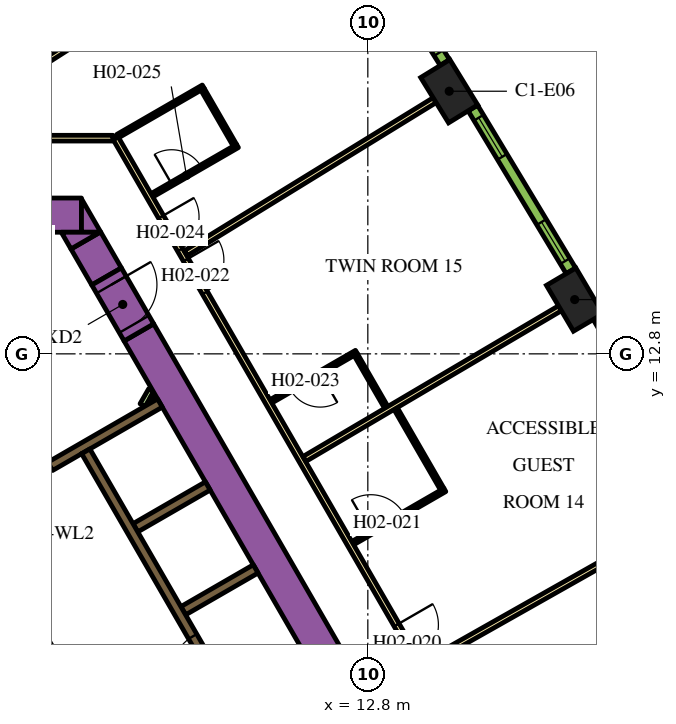
"""IFC4 building model, lengths in metres.
Left out: names, types, materials, properties, quantities, classifications, styles, units other than length and angle.
Written with IfcOpenShell. Run it as: python <this file> out.ifc"""

import sys

from ifc_helpers import new_model, si_unit, direction, frame, frame_2d, origin, origin_2d, place, context, subcontext, project, spatial, polyline, rectangle, outline, extrude, element, fill, save


model = new_model("IFC4")
c1 = context("Model", 3, precision=1e-05, world=origin(), true_north=direction((0.0, 1.0)))
c2 = subcontext(c1, "Body", "Model", "MODEL_VIEW")
j1 = project(units=[si_unit("LENGTHUNIT", "METRE"), si_unit("PLANEANGLEUNIT", "RADIAN")], contexts=[c1])
p1 = place(None, origin())
s1 = spatial("IfcSite", under=j1, at=p1, CompositionType="ELEMENT")
p2 = place(p1, origin())
s2 = spatial("IfcBuilding", under=s1, at=p2, CompositionType="ELEMENT")
p3 = place(p2, frame((0.0, 0.0, 47.1)))
s3 = spatial("IfcBuildingStorey", under=s2, at=p3, CompositionType="ELEMENT", Elevation=47.1)
for number, where, z_axis, x_axis in (
    (1, (18.243, 14.228, 0.0), (0.0, 0.0, 1.0), (-0.508, 0.861, 0.0)),
    (2, (14.942, 19.71, 0.0), (0.0, 0.0, 1.0), (-0.524, 0.852, 0.0)),
):
    element("IfcColumn", number, at=place(p3, frame(where, z_axis=z_axis, x_axis=x_axis)), inside=s3, PredefinedType="COLUMN", context=c2, shape_type="SweptSolid", body=[
        extrude(rectangle(XDim=1.4, YDim=0.9, at=origin_2d()), origin(), (0.0, 0.0, 1.0), 3.9),
    ])
p4 = place(p3, frame((6.776, 13.364, 0.0), z_axis=(0.0, 0.0, 1.0), x_axis=(0.500004177138, -0.8660229921, 0.0)))
e3 = element("IfcWall", 3, at=p4, inside=s3, PredefinedType="SOLIDWALL", context=c2, shape_type="SweptSolid", body=[
    extrude(rectangle(XDim=20.204, YDim=0.9, at=frame_2d((10.102, 0.0))), origin(), (0.0, 0.0, 1.0), 3.9),
])
p5 = place(p3, frame((-4.224, 16.45, 0.0), z_axis=(0.0, 0.0, 1.0), x_axis=(1.0, 0.0, 0.0)))
e4 = element("IfcWall", 4, at=p5, inside=s3, PredefinedType="SOLIDWALL", context=c2, shape_type="SweptSolid", body=[
    extrude(rectangle(XDim=9.488, YDim=0.9, at=frame_2d((4.744, 0.0))), origin(), (0.0, 0.0, 1.0), 3.9),
])
p6 = place(p3, origin())
e5 = element("IfcWall", 5, at=p6, inside=s3, PredefinedType="SOLIDWALL", context=c2, shape_type="SweptSolid", body=[
    extrude(outline(polyline([(5.265, 16.0), (5.265, 16.88), (5.773, 16.0), (5.265, 16.0)])), origin(), (0.0, 0.0, 1.0), 3.9),
])
p7 = place(p3, frame((5.926, 14.836, 0.0), z_axis=(0.0, 0.0, 1.0), x_axis=(-0.500076735116, 0.865981096212, 0.0)))
e6 = element("IfcWall", 6, at=p7, inside=s3, PredefinedType="SOLIDWALL", context=c2, shape_type="SweptSolid", body=[
    extrude(rectangle(XDim=1.094, YDim=0.9, at=frame_2d((0.547, 0.0))), origin(), (0.0, 0.0, 1.0), 3.9),
])
e7 = element("IfcWall", 7, at=p6, inside=s3, PredefinedType="SOLIDWALL", context=c2, shape_type="SweptSolid", body=[
    extrude(outline(polyline([(4.734, 16.0), (5.75, 16.0), (4.988, 15.56), (4.734, 16.0)])), origin(), (0.0, 0.0, 1.0), 3.9),
])
for number, where, z_axis, x_axis in (
    (8, (7.944, 6.041, 0.0), (0.0, 0.0, 1.0), (0.866, 0.5, 0.0)),
    (9, (6.684, 8.224, 0.0), (0.0, 0.0, 1.0), (0.866, 0.5, 0.0)),
):
    element("IfcWall", number, at=place(p3, frame(where, z_axis=z_axis, x_axis=x_axis)), inside=s3, PredefinedType="SOLIDWALL", context=c2, shape_type="SweptSolid", body=[
        extrude(rectangle(XDim=2.2, YDim=0.25, at=frame_2d((1.1, 0.0))), origin(), (0.0, 0.0, 1.0), 3.9),
    ])
e10 = element("IfcWall", 10, at=p6, inside=s3, PredefinedType="SOLIDWALL", context=c2, shape_type="SweptSolid", body=[
    extrude(outline(polyline([(5.27, 10.173), (5.27, 10.173), (4.683, 9.834), (4.504, 9.731), (4.442, 9.839), (4.431, 9.856), (4.419, 9.871), (4.406, 9.885), (4.39, 9.898), (4.374, 9.909), (4.357, 9.918), (4.341, 9.925), (7.266, 11.614), (7.391, 11.398), (5.486, 10.298), (5.486, 10.298), (5.27, 10.173), (5.27, 10.173)])), origin(), (0.0, 0.0, 1.0), 3.9),
])
p8 = place(p3, frame((5.97, -2.591, 0.0), z_axis=(0.0, 0.0, 1.0), x_axis=(-0.499994469932, 0.866028596547, 0.0)))
e11 = element("IfcWall", 11, at=p8, inside=s3, PredefinedType="SOLIDWALL", context=c2, shape_type="SweptSolid", body=[
    extrude(rectangle(XDim=10.488, YDim=0.25, at=frame_2d((5.244, 0.0))), origin(), (0.0, 0.0, 1.0), 3.9),
])
p9 = place(p3, frame((6.872, 11.45, 0.0), z_axis=(0.0, 0.0, 1.0), x_axis=(0.499846793097, 0.866113839764, 0.0)))
e12 = element("IfcWall", 12, at=p9, inside=s3, PredefinedType="PARTITIONING", context=c2, shape_type="SweptSolid", body=[
    extrude(rectangle(XDim=0.453, YDim=0.15, at=frame_2d((0.227, 0.0))), origin(), (0.0, 0.0, 1.0), 2.75),
])
p10 = place(p3, frame((7.131, 11.6, 0.0), z_axis=(0.0, 0.0, 1.0), x_axis=(0.498600033135, 0.866832167699, 0.0)))
e13 = element("IfcWall", 13, at=p10, inside=s3, PredefinedType="PARTITIONING", context=c2, shape_type="SweptSolid", body=[
    extrude(rectangle(XDim=0.107, YDim=0.15, at=frame_2d((0.053, 0.0))), origin(), (0.0, 0.0, 1.0), 2.75),
])
p11 = place(p3, frame((11.553, -0.46, 0.0), z_axis=(0.0, 0.0, 1.0), x_axis=(-0.500006514828, 0.866021642414, 0.0)))
e14 = element("IfcWall", 14, at=p11, inside=s3, PredefinedType="SOLIDWALL", context=c2, shape_type="SweptSolid", body=[
    extrude(rectangle(XDim=12.35, YDim=0.25, at=frame_2d((6.175, 0.0))), origin(), (0.0, 0.0, 1.0), 3.9),
])
p12 = place(p11, frame((0.585, 0.0, 0.0)))
e15 = element("IfcOpeningElement", 15, at=p12, cuts=e14, PredefinedType="OPENING", context=c2, shape_type="SweptSolid", body=[
    extrude(rectangle(XDim=1.1, YDim=2.1, at=frame_2d((0.55, 1.05))), frame((0.0, 0.135, 0.0), z_axis=(0.0, -1.0, 0.0), x_axis=(1.0, 0.0, 0.0)), (0.0, 0.0, 1.0), 0.27),
])
p13 = place(p11, frame((3.105, 0.0, 0.0)))
e16 = element("IfcOpeningElement", 16, at=p13, cuts=e14, PredefinedType="OPENING", context=c2, shape_type="SweptSolid", body=[
    extrude(rectangle(XDim=1.1, YDim=2.1, at=frame_2d((0.55, 1.05))), frame((0.0, 0.135, 0.0), z_axis=(0.0, -1.0, 0.0), x_axis=(1.0, 0.0, 0.0)), (0.0, 0.0, 1.0), 0.27),
])
p14 = place(p11, frame((5.625, 0.0, 0.0)))
e17 = element("IfcOpeningElement", 17, at=p14, cuts=e14, PredefinedType="OPENING", context=c2, shape_type="SweptSolid", body=[
    extrude(rectangle(XDim=1.1, YDim=2.1, at=frame_2d((0.55, 1.05))), frame((0.0, 0.135, 0.0), z_axis=(0.0, -1.0, 0.0), x_axis=(1.0, 0.0, 0.0)), (0.0, 0.0, 1.0), 0.27),
])
p15 = place(p3, frame((8.565, -2.185, 0.0), z_axis=(0.0, 0.0, 1.0), x_axis=(-0.499997954832, 0.866026584559, 0.0)))
e18 = element("IfcWall", 18, at=p15, inside=s3, PredefinedType="SOLIDWALL", context=c2, shape_type="SweptSolid", body=[
    extrude(rectangle(XDim=12.35, YDim=0.25, at=frame_2d((6.175, 0.0))), origin(), (0.0, 0.0, 1.0), 3.9),
])
p16 = place(p15, frame((5.725, 0.0, 0.0)))
e19 = element("IfcOpeningElement", 19, at=p16, cuts=e18, PredefinedType="OPENING", context=c2, shape_type="SweptSolid", body=[
    extrude(rectangle(XDim=0.9, YDim=2.1, at=frame_2d((0.45, 1.05))), frame((0.0, 0.135, 0.0), z_axis=(0.0, -1.0, 0.0), x_axis=(1.0, 0.0, 0.0)), (0.0, 0.0, 1.0), 0.27),
])
p17 = place(p3, frame((5.926, 14.836, 0.0), z_axis=(0.0, 0.0, 1.0), x_axis=(0.500062241894, -0.865989465428, 0.0)))
e20 = element("IfcWall", 20, at=p17, inside=s3, PredefinedType="SOLIDWALL", context=c2, shape_type="SweptSolid", body=[
    extrude(rectangle(XDim=1.7, YDim=0.9, at=frame_2d((0.85, 0.0))), origin(), (0.0, 0.0, 1.0), 3.9),
])
p18 = place(p17, frame((0.25, 0.0, 0.0)))
e21 = element("IfcOpeningElement", 21, at=p18, cuts=e20, PredefinedType="OPENING", context=c2, shape_type="SweptSolid", body=[
    extrude(rectangle(XDim=1.2, YDim=2.1, at=frame_2d((0.6, 1.05))), frame((0.0, 0.46, 0.0), z_axis=(0.0, -1.0, 0.0), x_axis=(1.0, 0.0, 0.0)), (0.0, 0.0, 1.0), 0.92),
])
p19 = place(p3, frame((6.163, 18.475, 0.0), z_axis=(0.0, 0.0, 1.0), x_axis=(0.500001317485, -0.866024643133, 0.0)))
e22 = element("IfcWall", 22, at=p19, inside=s3, PredefinedType="PARTITIONING", context=c2, shape_type="SweptSolid", body=[
    extrude(rectangle(XDim=25.767, YDim=0.15, at=frame_2d((12.883, 0.0))), origin(), (0.0, 0.0, 1.0), 2.75),
])
p20 = place(p19, frame((24.586, 0.0, 0.0)))
e23 = element("IfcOpeningElement", 23, at=p20, cuts=e22, PredefinedType="OPENING", context=c2, shape_type="SweptSolid", body=[
    extrude(rectangle(XDim=1.0, YDim=2.1, at=frame_2d((0.5, 1.05))), frame((0.0, 0.085, 0.0), z_axis=(0.0, -1.0, 0.0), x_axis=(1.0, 0.0, 0.0)), (0.0, 0.0, 1.0), 0.17),
])
p21 = place(p19, frame((16.196, 0.0, 0.0)))
e24 = element("IfcOpeningElement", 24, at=p21, cuts=e22, PredefinedType="OPENING", context=c2, shape_type="SweptSolid", body=[
    extrude(rectangle(XDim=1.0, YDim=2.1, at=frame_2d((0.5, 1.05))), frame((0.0, 0.085, 0.0), z_axis=(0.0, -1.0, 0.0), x_axis=(1.0, 0.0, 0.0)), (0.0, 0.0, 1.0), 0.17),
])
p22 = place(p19, frame((14.789, 0.0, 0.0)))
e25 = element("IfcOpeningElement", 25, at=p22, cuts=e22, PredefinedType="OPENING", context=c2, shape_type="SweptSolid", body=[
    extrude(rectangle(XDim=1.1, YDim=2.1, at=frame_2d((0.55, 1.05))), frame((0.0, 0.085, 0.0), z_axis=(0.0, -1.0, 0.0), x_axis=(1.0, 0.0, 0.0)), (0.0, 0.0, 1.0), 0.17),
])
p23 = place(p19, frame((3.698, 0.0, 0.0)))
e26 = element("IfcOpeningElement", 26, at=p23, cuts=e22, PredefinedType="OPENING", context=c2, shape_type="SweptSolid", body=[
    extrude(rectangle(XDim=1.0, YDim=2.1, at=frame_2d((0.5, 1.05))), frame((0.0, 0.085, 0.0), z_axis=(0.0, -1.0, 0.0), x_axis=(1.0, 0.0, 0.0)), (0.0, 0.0, 1.0), 0.17),
])
p24 = place(p19, frame((2.391, 0.0, 0.0)))
e27 = element("IfcOpeningElement", 27, at=p24, cuts=e22, PredefinedType="OPENING", context=c2, shape_type="SweptSolid", body=[
    extrude(rectangle(XDim=1.0, YDim=2.1, at=frame_2d((0.5, 1.05))), frame((0.0, 0.085, 0.0), z_axis=(0.0, -1.0, 0.0), x_axis=(1.0, 0.0, 0.0)), (0.0, 0.0, 1.0), 0.17),
])
p25 = place(p3, frame((0.825, 18.475, 0.0), z_axis=(0.0, 0.0, 1.0), x_axis=(1.0, 0.0, 0.0)))
e28 = element("IfcWall", 28, at=p25, inside=s3, PredefinedType="PARTITIONING", context=c2, shape_type="SweptSolid", body=[
    extrude(rectangle(XDim=5.268, YDim=0.15, at=frame_2d((2.634, 0.0))), origin(), (0.0, 0.0, 1.0), 2.75),
])
p26 = place(p3, frame((11.16, 24.888, 0.0), z_axis=(0.0, 0.0, 1.0), x_axis=(-0.84199813156, -0.539480441211, 0.0)))
e29 = element("IfcWall", 29, at=p26, inside=s3, PredefinedType="PARTITIONING", context=c2, shape_type="SweptSolid", body=[
    extrude(rectangle(XDim=11.638, YDim=0.15, at=frame_2d((5.819, 0.0))), origin(), (0.0, 0.0, 1.0), 2.75),
])
p27 = place(p3, frame((14.558, 19.475, 0.0), z_axis=(0.0, 0.0, 1.0), x_axis=(-0.851829455142, -0.523819223925, 0.0)))
e30 = element("IfcWall", 30, at=p27, inside=s3, PredefinedType="PARTITIONING", context=c2, shape_type="SweptSolid", body=[
    extrude(rectangle(XDim=7.688, YDim=0.15, at=frame_2d((3.844, 0.0))), origin(), (0.0, 0.0, 1.0), 2.75),
])
p28 = place(p3, frame((17.856, 13.999, 0.0), z_axis=(0.0, 0.0, 1.0), x_axis=(-0.861371519381, -0.507975497047, 0.0)))
e31 = element("IfcWall", 31, at=p28, inside=s3, PredefinedType="PARTITIONING", context=c2, shape_type="SweptSolid", body=[
    extrude(rectangle(XDim=7.804, YDim=0.15, at=frame_2d((3.902, 0.0))), origin(), (0.0, 0.0, 1.0), 2.75),
])
p29 = place(p3, frame((21.052, 8.464, 0.0), z_axis=(0.0, 0.0, 1.0), x_axis=(-0.87059371954, -0.492002617368, 0.0)))
e32 = element("IfcWall", 32, at=p29, inside=s3, PredefinedType="PARTITIONING", context=c2, shape_type="SweptSolid", body=[
    extrude(rectangle(XDim=7.803, YDim=0.15, at=frame_2d((3.902, 0.0))), origin(), (0.0, 0.0, 1.0), 2.75),
])
p30 = place(p3, frame((12.402, 7.819, 0.0), z_axis=(0.0, 0.0, 1.0), x_axis=(0.866034573852, 0.49998411664, 0.0)))
e33 = element("IfcWall", 33, at=p30, inside=s3, PredefinedType="PARTITIONING", context=c2, shape_type="SweptSolid", body=[
    extrude(rectangle(XDim=2.8, YDim=0.1, at=frame_2d((1.4, 0.0))), origin(), (0.0, 0.0, 1.0), 2.75),
])
p31 = place(p30, frame((0.55, 0.0, 0.0)))
e34 = element("IfcOpeningElement", 34, at=p31, cuts=e33, PredefinedType="OPENING", context=c2, shape_type="SweptSolid", body=[
    extrude(rectangle(XDim=1.0, YDim=2.1, at=frame_2d((0.5, 1.05))), frame((0.0, 0.06, 0.0), z_axis=(0.0, -1.0, 0.0), x_axis=(1.0, 0.0, 0.0)), (0.0, 0.0, 1.0), 0.12),
])
p32 = place(p3, frame((14.759, 9.237, 0.0), z_axis=(0.0, 0.0, 1.0), x_axis=(-0.499943856944, 0.866057815567, 0.0)))
e35 = element("IfcWall", 35, at=p32, inside=s3, PredefinedType="PARTITIONING", context=c2, shape_type="SweptSolid", body=[
    extrude(rectangle(XDim=2.45, YDim=0.1, at=frame_2d((1.225, 0.0))), origin(), (0.0, 0.0, 1.0), 2.75),
])
p33 = place(p3, frame((12.5, 12.849, 0.0), z_axis=(0.0, 0.0, 1.0), x_axis=(-0.866021400173, -0.500006934395, 0.0)))
e36 = element("IfcWall", 36, at=p33, inside=s3, PredefinedType="PARTITIONING", context=c2, shape_type="SweptSolid", body=[
    extrude(rectangle(XDim=2.6, YDim=0.1, at=frame_2d((1.3, 0.0))), origin(), (0.0, 0.0, 1.0), 2.75),
])
p34 = place(p33, frame((1.1, 0.0, 0.0)))
e37 = element("IfcOpeningElement", 37, at=p34, cuts=e36, PredefinedType="OPENING", context=c2, shape_type="SweptSolid", body=[
    extrude(rectangle(XDim=0.9, YDim=2.1, at=frame_2d((0.45, 1.05))), frame((0.0, 0.06, 0.0), z_axis=(0.0, -1.0, 0.0), x_axis=(1.0, 0.0, 0.0)), (0.0, 0.0, 1.0), 0.12),
])
p35 = place(p3, frame((12.482, 12.781, 0.0), z_axis=(0.0, 0.0, 1.0), x_axis=(0.500061482766, -0.865989903783, 0.0)))
e38 = element("IfcWall", 38, at=p35, inside=s3, PredefinedType="PARTITIONING", context=c2, shape_type="SweptSolid", body=[
    extrude(rectangle(XDim=1.6, YDim=0.1, at=frame_2d((0.8, 0.0))), origin(), (0.0, 0.0, 1.0), 2.75),
])
p36 = place(p3, frame((7.118, 16.971, 0.0), z_axis=(0.0, 0.0, 1.0), x_axis=(0.866021400173, 0.500006934395, 0.0)))
e39 = element("IfcWall", 39, at=p36, inside=s3, PredefinedType="PARTITIONING", context=c2, shape_type="SweptSolid", body=[
    extrude(rectangle(XDim=2.6, YDim=0.1, at=frame_2d((1.3, 0.0))), origin(), (0.0, 0.0, 1.0), 2.75),
])
p37 = place(p36, frame((0.6, 0.0, 0.0)))
e40 = element("IfcOpeningElement", 40, at=p37, cuts=e39, PredefinedType="OPENING", context=c2, shape_type="SweptSolid", body=[
    extrude(rectangle(XDim=0.9, YDim=2.1, at=frame_2d((0.45, 1.05))), frame((0.0, 0.06, 0.0), z_axis=(0.0, -1.0, 0.0), x_axis=(1.0, 0.0, 0.0)), (0.0, 0.0, 1.0), 0.12),
])
p38 = place(p3, frame((9.302, 18.289, 0.0), z_axis=(0.0, 0.0, 1.0), x_axis=(-0.500062241894, 0.865989465428, 0.0)))
e41 = element("IfcWall", 41, at=p38, inside=s3, PredefinedType="PARTITIONING", context=c2, shape_type="SweptSolid", body=[
    extrude(rectangle(XDim=1.7, YDim=0.1, at=frame_2d((0.85, 0.0))), origin(), (0.0, 0.0, 1.0), 2.75),
])
p39 = place(p3, frame((6.218, 18.53, 0.0), z_axis=(0.0, 0.0, 1.0), x_axis=(0.865997922154, 0.500047596559, 0.0)))
e42 = element("IfcWall", 42, at=p39, inside=s3, PredefinedType="PARTITIONING", context=c2, shape_type="SweptSolid", body=[
    extrude(rectangle(XDim=2.6, YDim=0.1, at=frame_2d((1.3, 0.0))), origin(), (0.0, 0.0, 1.0), 2.75),
])
p40 = place(p3, frame((21.357, 9.445, 0.0), z_axis=(0.0, 0.0, 1.0), x_axis=(-0.50002123722, 0.866013142123, 0.0)))
e43 = element("IfcWall", 43, at=p40, inside=s3, PredefinedType="SOLIDWALL", context=c2, shape_type="SweptSolid", body=[
    extrude(rectangle(XDim=4.998, YDim=0.29, at=frame_2d((2.499, 0.0))), origin(), (0.0, 0.0, 1.0), 3.65),
])
p41 = place(p40, frame((0.297, 0.0, 0.9)))
e44 = element("IfcOpeningElement", 44, at=p41, cuts=e43, PredefinedType="OPENING", context=c2, shape_type="SweptSolid", body=[
    extrude(rectangle(XDim=1.2, YDim=2.15, at=frame_2d((0.6, 1.075))), frame((0.0, 0.155, 0.0), z_axis=(0.0, -1.0, 0.0), x_axis=(1.0, 0.0, 0.0)), (0.0, 0.0, 1.0), 0.31),
])
p42 = place(p40, frame((3.501, 0.0, 0.9)))
e45 = element("IfcOpeningElement", 45, at=p42, cuts=e43, PredefinedType="OPENING", context=c2, shape_type="SweptSolid", body=[
    extrude(rectangle(XDim=1.2, YDim=2.15, at=frame_2d((0.6, 1.075))), frame((0.0, 0.155, 0.0), z_axis=(0.0, -1.0, 0.0), x_axis=(1.0, 0.0, 0.0)), (0.0, 0.0, 1.0), 0.31),
])
p43 = place(p3, frame((18.143, 14.986, 0.0), z_axis=(0.0, 0.0, 1.0), x_axis=(-0.515938796285, 0.856625448191, 0.0)))
e46 = element("IfcWall", 46, at=p43, inside=s3, PredefinedType="SOLIDWALL", context=c2, shape_type="SweptSolid", body=[
    extrude(rectangle(XDim=4.998, YDim=0.29, at=frame_2d((2.499, 0.0))), origin(), (0.0, 0.0, 1.0), 3.65),
])
p44 = place(p43, frame((0.297, 0.0, 0.9)))
e47 = element("IfcOpeningElement", 47, at=p44, cuts=e46, PredefinedType="OPENING", context=c2, shape_type="SweptSolid", body=[
    extrude(rectangle(XDim=1.2, YDim=2.15, at=frame_2d((0.6, 1.075))), frame((0.0, 0.155, 0.0), z_axis=(0.0, -1.0, 0.0), x_axis=(1.0, 0.0, 0.0)), (0.0, 0.0, 1.0), 0.31),
])
p45 = place(p43, frame((3.501, 0.0, 0.9)))
e48 = element("IfcOpeningElement", 48, at=p45, cuts=e46, PredefinedType="OPENING", context=c2, shape_type="SweptSolid", body=[
    extrude(rectangle(XDim=1.2, YDim=2.15, at=frame_2d((0.6, 1.075))), frame((0.0, 0.155, 0.0), z_axis=(0.0, -1.0, 0.0), x_axis=(1.0, 0.0, 0.0)), (0.0, 0.0, 1.0), 0.31),
])
p46 = place(p3, frame((14.827, 20.466, 0.0), z_axis=(0.0, 0.0, 1.0), x_axis=(-0.531688286542, 0.846940119462, 0.0)))
e49 = element("IfcWall", 49, at=p46, inside=s3, PredefinedType="SOLIDWALL", context=c2, shape_type="SweptSolid", body=[
    extrude(rectangle(XDim=4.998, YDim=0.29, at=frame_2d((2.499, 0.0))), origin(), (0.0, 0.0, 1.0), 3.65),
])
p47 = place(p46, frame((0.297, 0.0, 0.9)))
e50 = element("IfcOpeningElement", 50, at=p47, cuts=e49, PredefinedType="OPENING", context=c2, shape_type="SweptSolid", body=[
    extrude(rectangle(XDim=1.2, YDim=2.15, at=frame_2d((0.6, 1.075))), frame((0.0, 0.155, 0.0), z_axis=(0.0, -1.0, 0.0), x_axis=(1.0, 0.0, 0.0)), (0.0, 0.0, 1.0), 0.31),
])
p48 = place(p46, frame((3.501, 0.0, 0.9)))
e51 = element("IfcOpeningElement", 51, at=p48, cuts=e49, PredefinedType="OPENING", context=c2, shape_type="SweptSolid", body=[
    extrude(rectangle(XDim=1.2, YDim=2.15, at=frame_2d((0.6, 1.075))), frame((0.0, 0.155, 0.0), z_axis=(0.0, -1.0, 0.0), x_axis=(1.0, 0.0, 0.0)), (0.0, 0.0, 1.0), 0.31),
])
p49 = place(p14, origin())
e52 = element("IfcDoor", 52, at=p49, inside=s3, OperationType="DOUBLE_DOOR_SLIDING", PredefinedType="DOOR", context=c2, shape_type="SweptSolid", body=[
    extrude(rectangle(XDim=1.1, YDim=2.1, at=frame_2d((0.55, 1.05))), frame((0.0, 0.025, 0.0), z_axis=(0.0, -1.0, 0.0), x_axis=(1.0, 0.0, 0.0)), (0.0, 0.0, 1.0), 0.05),
])
fill(e17, e52)
p50 = place(p18, origin())
e53 = element("IfcDoor", 53, at=p50, inside=s3, OperationType="SINGLE_SWING_LEFT", PredefinedType="DOOR", context=c2, shape_type="SweptSolid", body=[
    extrude(rectangle(XDim=1.2, YDim=2.1, at=frame_2d((0.6, 1.05))), frame((0.0, 0.025, 0.0), z_axis=(0.0, -1.0, 0.0), x_axis=(1.0, 0.0, 0.0)), (0.0, 0.0, 1.0), 0.05),
])
fill(e21, e53)
p51 = place(p22, origin())
e54 = element("IfcDoor", 54, at=p51, inside=s3, OperationType="SINGLE_SWING_RIGHT", PredefinedType="DOOR", context=c2, shape_type="SweptSolid", body=[
    extrude(rectangle(XDim=1.1, YDim=2.1, at=frame_2d((0.55, 1.05))), frame((0.0, 0.025, 0.0), z_axis=(0.0, -1.0, 0.0), x_axis=(1.0, 0.0, 0.0)), (0.0, 0.0, 1.0), 0.05),
])
fill(e25, e54)
p52 = place(p31, origin())
e55 = element("IfcDoor", 55, at=p52, inside=s3, OperationType="SINGLE_SWING_LEFT", PredefinedType="DOOR", context=c2, shape_type="SweptSolid", body=[
    extrude(rectangle(XDim=1.0, YDim=2.1, at=frame_2d((0.5, 1.05))), frame((0.0, 0.025, 0.0), z_axis=(0.0, -1.0, 0.0), x_axis=(1.0, 0.0, 0.0)), (0.0, 0.0, 1.0), 0.05),
])
fill(e34, e55)
p53 = place(p23, origin())
e56 = element("IfcDoor", 56, at=p53, inside=s3, OperationType="SINGLE_SWING_LEFT", PredefinedType="DOOR", context=c2, shape_type="SweptSolid", body=[
    extrude(rectangle(XDim=1.0, YDim=2.1, at=frame_2d((0.5, 1.05))), frame((0.0, 0.025, 0.0), z_axis=(0.0, -1.0, 0.0), x_axis=(1.0, 0.0, 0.0)), (0.0, 0.0, 1.0), 0.05),
])
fill(e26, e56)
p54 = place(p34, origin())
e57 = element("IfcDoor", 57, at=p54, inside=s3, OperationType="SINGLE_SWING_RIGHT", PredefinedType="DOOR", context=c2, shape_type="SweptSolid", body=[
    extrude(rectangle(XDim=0.9, YDim=2.1, at=frame_2d((0.45, 1.05))), frame((0.0, 0.025, 0.0), z_axis=(0.0, -1.0, 0.0), x_axis=(1.0, 0.0, 0.0)), (0.0, 0.0, 1.0), 0.05),
])
fill(e37, e57)
p55 = place(p24, origin())
e58 = element("IfcDoor", 58, at=p55, inside=s3, OperationType="SINGLE_SWING_RIGHT", PredefinedType="DOOR", context=c2, shape_type="SweptSolid", body=[
    extrude(rectangle(XDim=1.0, YDim=2.1, at=frame_2d((0.5, 1.05))), frame((0.0, 0.025, 0.0), z_axis=(0.0, -1.0, 0.0), x_axis=(1.0, 0.0, 0.0)), (0.0, 0.0, 1.0), 0.05),
])
fill(e27, e58)
p56 = place(p37, origin())
e59 = element("IfcDoor", 59, at=p56, inside=s3, OperationType="SINGLE_SWING_LEFT", PredefinedType="DOOR", context=c2, shape_type="SweptSolid", body=[
    extrude(rectangle(XDim=0.9, YDim=2.1, at=frame_2d((0.45, 1.05))), frame((0.0, 0.025, 0.0), z_axis=(0.0, -1.0, 0.0), x_axis=(1.0, 0.0, 0.0)), (0.0, 0.0, 1.0), 0.05),
])
fill(e40, e59)
p57 = place(p44, origin())
e60 = element("IfcWindow", 60, at=p57, inside=s3, PartitioningType="DOUBLE_PANEL_VERTICAL", PredefinedType="WINDOW", context=c2, shape_type="SweptSolid", body=[
    extrude(rectangle(XDim=1.2, YDim=2.15, at=frame_2d((0.6, 1.075))), frame((0.0, 0.015, 0.0), z_axis=(0.0, -1.0, 0.0), x_axis=(1.0, 0.0, 0.0)), (0.0, 0.0, 1.0), 0.06),
])
fill(e47, e60)
p58 = place(p45, origin())
e61 = element("IfcWindow", 61, at=p58, inside=s3, PartitioningType="DOUBLE_PANEL_VERTICAL", PredefinedType="WINDOW", context=c2, shape_type="SweptSolid", body=[
    extrude(rectangle(XDim=1.2, YDim=2.15, at=frame_2d((0.6, 1.075))), frame((0.0, 0.015, 0.0), z_axis=(0.0, -1.0, 0.0), x_axis=(1.0, 0.0, 0.0)), (0.0, 0.0, 1.0), 0.06),
])
fill(e48, e61)
p59 = place(p47, origin())
e62 = element("IfcWindow", 62, at=p59, inside=s3, PartitioningType="DOUBLE_PANEL_VERTICAL", PredefinedType="WINDOW", context=c2, shape_type="SweptSolid", body=[
    extrude(rectangle(XDim=1.2, YDim=2.15, at=frame_2d((0.6, 1.075))), frame((0.0, 0.015, 0.0), z_axis=(0.0, -1.0, 0.0), x_axis=(1.0, 0.0, 0.0)), (0.0, 0.0, 1.0), 0.06),
])
fill(e50, e62)
save(model, sys.argv[1])
